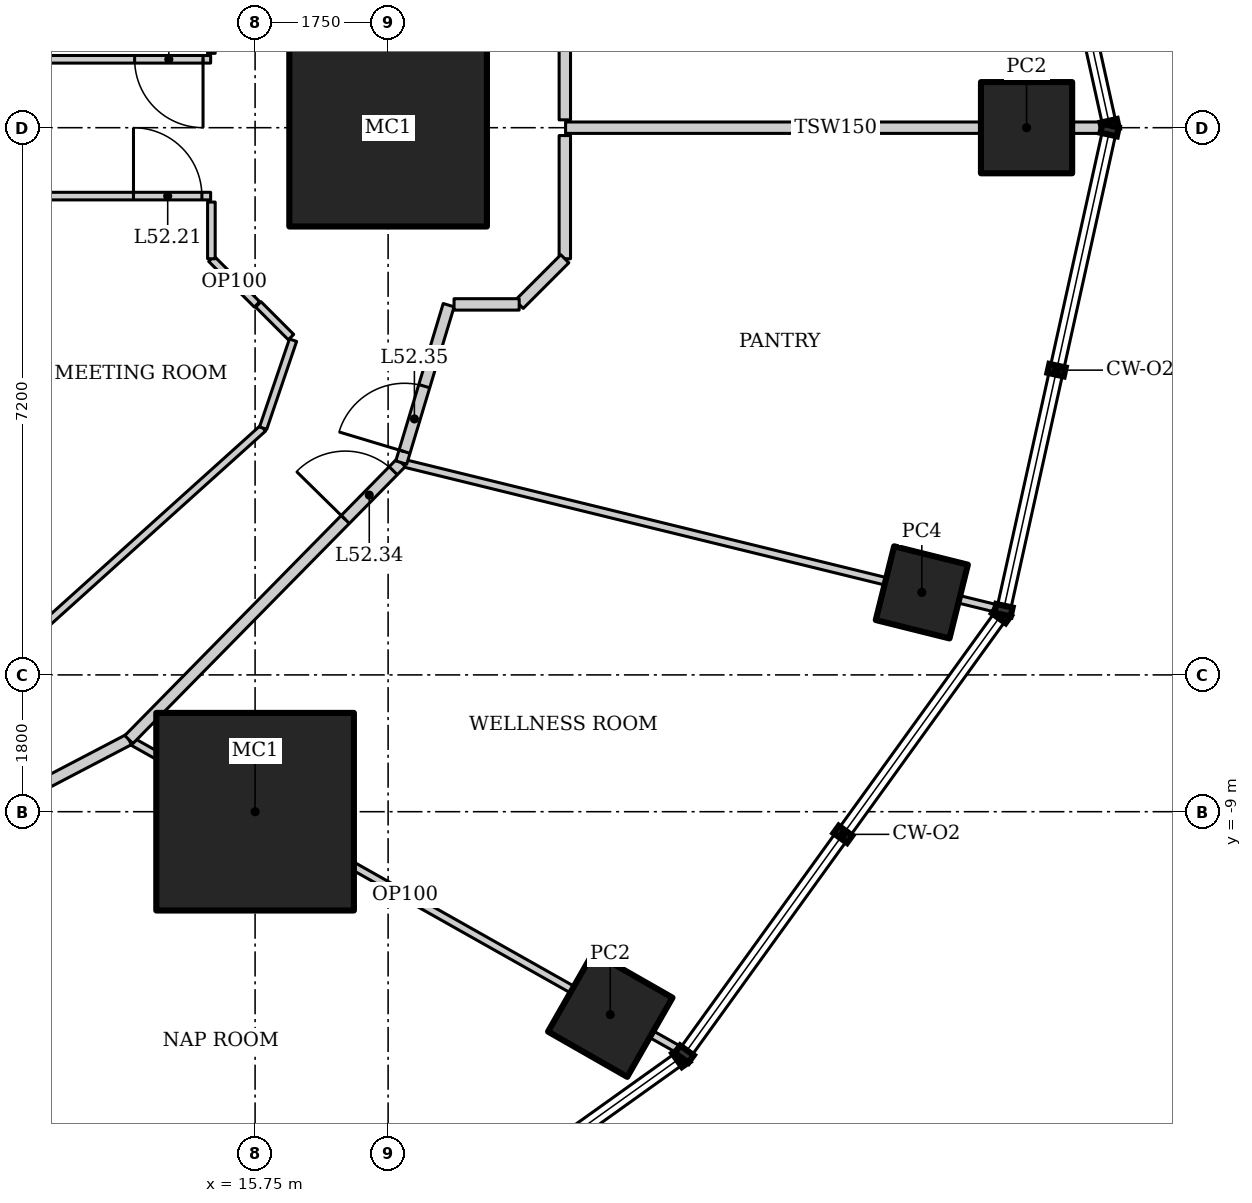
"""IFC4 building model, lengths in metres.
Left out: names, types, materials, properties, quantities, classifications, styles, units other than length and angle.
Written with IfcOpenShell. Run it as: python <this file> out.ifc"""

import sys

from ifc_helpers import new_model, si_unit, direction, frame, frame_2d, origin, origin_2d, place, context, subcontext, project, spatial, rectangle, hollow_rectangle, extrude, element, fill, save


model = new_model("IFC4")
c1 = context("Model", 3, precision=1e-05, world=origin(), true_north=direction((0.0, 1.0)))
c2 = subcontext(c1, "Body", "Model", "MODEL_VIEW")
j1 = project(units=[si_unit("LENGTHUNIT", "METRE"), si_unit("PLANEANGLEUNIT", "RADIAN")], contexts=[c1])
p1 = place(None, origin())
s1 = spatial("IfcSite", under=j1, at=p1, CompositionType="ELEMENT")
p2 = place(p1, origin())
s2 = spatial("IfcBuilding", under=s1, at=p2, CompositionType="ELEMENT")
p3 = place(p2, frame((0.0, 0.0, 224.2)))
s3 = spatial("IfcBuildingStorey", under=s2, at=p3, CompositionType="ELEMENT", Elevation=224.2)
for number, where, z_axis, x_axis in (
    (1, (17.5, 0.0, 0.0), (0.0, 0.0, 1.0), (1.0, 0.0, 0.0)),
    (2, (15.75, -9.0, 0.0), (0.0, 0.0, 1.0), (1.0, 0.0, 0.0)),
):
    element("IfcColumn", number, at=place(p3, frame(where, z_axis=z_axis, x_axis=x_axis)), inside=s3, PredefinedType="COLUMN", context=c2, shape_type="SweptSolid", body=[
        extrude(hollow_rectangle(XDim=2.6, YDim=2.6, WallThickness=0.13, at=origin_2d()), origin(), (0.0, 0.0, 1.0), 4.2),
    ])
for number, where, z_axis, x_axis in (
    (3, (25.9, 0.0, 0.0), (0.0, 0.0, 1.0), (1.0, 0.0, 0.0)),
    (4, (20.423, -11.67, 0.0), (0.0, 0.0, 1.0), (0.496, 0.868, 0.0)),
):
    element("IfcColumn", number, at=place(p3, frame(where, z_axis=z_axis, x_axis=x_axis)), inside=s3, PredefinedType="COLUMN", context=c2, shape_type="SweptSolid", body=[
        extrude(hollow_rectangle(XDim=1.2, YDim=1.2, WallThickness=0.1, at=origin_2d()), origin(), (0.0, 0.0, 1.0), 4.2),
    ])
p4 = place(p3, frame((24.522, -6.114, 0.0), z_axis=(0.0, 0.0, 1.0), x_axis=(0.2419218956, 0.970295726276, 0.0)))
e5 = element("IfcColumn", 5, at=p4, inside=s3, PredefinedType="COLUMN", context=c2, shape_type="SweptSolid", body=[
    extrude(hollow_rectangle(XDim=1.0, YDim=1.0, WallThickness=0.08, at=origin_2d()), origin(), (0.0, 0.0, 1.0), 4.2),
])
p5 = place(p3, frame((15.709, -16.199, 0.0), z_axis=(0.0, 0.0, 1.0), x_axis=(-0.69875697861, 0.715359129978, 0.0)))
e6 = element("IfcWall", 6, at=p5, inside=s3, PredefinedType="PARTITIONING", context=c2, shape_type="SweptSolid", body=[
    extrude(rectangle(XDim=8.323, YDim=0.1, at=frame_2d((4.162, 0.0))), origin(), (0.0, 0.0, 1.0), 3.41),
])
p6 = place(p3, frame((21.358, -12.15, 0.0), z_axis=(0.0, 0.0, 1.0), x_axis=(-0.871080529249, 0.491140215786, 0.0)))
e7 = element("IfcWall", 7, at=p6, inside=s3, PredefinedType="PARTITIONING", context=c2, shape_type="SweptSolid", body=[
    extrude(rectangle(XDim=8.345, YDim=0.1, at=frame_2d((4.173, 0.0))), origin(), (0.0, 0.0, 1.0), 3.522),
])
p7 = place(p3, frame((25.543, -6.336, 0.0), z_axis=(0.0, 0.0, 1.0), x_axis=(-0.97123661777, 0.238116425942, 0.0)))
e8 = element("IfcWall", 8, at=p7, inside=s3, PredefinedType="PARTITIONING", context=c2, shape_type="SweptSolid", body=[
    extrude(rectangle(XDim=8.103, YDim=0.1, at=frame_2d((4.052, 0.0))), origin(), (0.0, 0.0, 1.0), 3.108),
])
p8 = place(p3, frame((9.893, -10.245, 0.0), z_axis=(0.0, 0.0, 1.0), x_axis=(0.886174439647, 0.463351769735, 0.0)))
e9 = element("IfcWall", 9, at=p8, inside=s3, PredefinedType="PARTITIONING", context=c2, shape_type="SweptSolid", body=[
    extrude(rectangle(XDim=4.735, YDim=0.15, at=frame_2d((2.367, 0.0))), origin(), (0.0, 0.0, 1.0), 4.05),
])
p9 = place(p8, frame((0.15, 0.0, 0.0)))
e10 = element("IfcOpeningElement", 10, at=p9, cuts=e9, PredefinedType="OPENING", context=c2, shape_type="SweptSolid", body=[
    extrude(rectangle(XDim=0.9, YDim=2.1, at=frame_2d((0.45, 1.05))), frame((0.0, 0.085, 0.0), z_axis=(0.0, -1.0, 0.0), x_axis=(1.0, 0.0, 0.0)), (0.0, 0.0, 1.0), 0.17),
])
p10 = place(p3, frame((14.089, -8.051, 0.0), z_axis=(0.0, 0.0, 1.0), x_axis=(0.701111216625, 0.713051934941, 0.0)))
e11 = element("IfcWall", 11, at=p10, inside=s3, PredefinedType="PARTITIONING", context=c2, shape_type="SweptSolid", body=[
    extrude(rectangle(XDim=5.112, YDim=0.15, at=frame_2d((2.556, 0.0))), origin(), (0.0, 0.0, 1.0), 4.05),
])
p11 = place(p10, frame((4.061, 0.0, 0.0)))
e12 = element("IfcOpeningElement", 12, at=p11, cuts=e11, PredefinedType="OPENING", context=c2, shape_type="SweptSolid", body=[
    extrude(rectangle(XDim=0.9, YDim=2.1, at=frame_2d((0.45, 1.05))), frame((0.0, 0.085, 0.0), z_axis=(0.0, -1.0, 0.0), x_axis=(1.0, 0.0, 0.0)), (0.0, 0.0, 1.0), 0.17),
])
p12 = place(p3, frame((15.856, -3.953, 0.0), z_axis=(0.0, 0.0, 1.0), x_axis=(-0.743177243228, -0.669094601046, 0.0)))
e13 = element("IfcWall", 13, at=p12, inside=s3, PredefinedType="PARTITIONING", context=c2, shape_type="SweptSolid", body=[
    extrude(rectangle(XDim=3.843, YDim=0.1, at=frame_2d((1.921, 0.0))), origin(), (0.0, 0.0, 1.0), 4.05),
])
p13 = place(p3, frame((26.944, 0.0, 0.0), z_axis=(0.0, 0.0, 1.0), x_axis=(-1.0, 0.0, 0.0)))
e14 = element("IfcWall", 14, at=p13, inside=s3, PredefinedType="PARTITIONING", context=c2, shape_type="SweptSolid", body=[
    extrude(rectangle(XDim=7.109, YDim=0.15, at=frame_2d((3.555, 0.0))), origin(), (0.0, 0.0, 1.0), 3.349),
])
p14 = place(p3, frame((17.673, -4.406, 0.0), z_axis=(0.0, 0.0, 1.0), x_axis=(0.288362447016, 0.957521330912, 0.0)))
e15 = element("IfcWall", 15, at=p14, inside=s3, PredefinedType="PARTITIONING", context=c2, shape_type="SweptSolid", body=[
    extrude(rectangle(XDim=2.163, YDim=0.15, at=frame_2d((1.082, 0.0))), origin(), (0.0, 0.0, 1.0), 4.05),
])
p15 = place(p14, frame((0.15, 0.0, 0.0)))
e16 = element("IfcOpeningElement", 16, at=p15, cuts=e15, PredefinedType="OPENING", context=c2, shape_type="SweptSolid", body=[
    extrude(rectangle(XDim=0.9, YDim=2.1, at=frame_2d((0.45, 1.05))), frame((0.0, 0.085, 0.0), z_axis=(0.0, -1.0, 0.0), x_axis=(1.0, 0.0, 0.0)), (0.0, 0.0, 1.0), 0.17),
])
p16 = place(p3, frame((13.0, -0.9, 0.0), z_axis=(0.0, 0.0, 1.0), x_axis=(1.0, 0.0, 0.0)))
e17 = element("IfcWall", 17, at=p16, inside=s3, PredefinedType="PARTITIONING", context=c2, shape_type="SweptSolid", body=[
    extrude(rectangle(XDim=2.165, YDim=0.1, at=frame_2d((1.083, 0.0))), origin(), (0.0, 0.0, 1.0), 4.05),
])
p17 = place(p16, frame((1.15, 0.0, 0.0)))
e18 = element("IfcOpeningElement", 18, at=p17, cuts=e17, PredefinedType="OPENING", context=c2, shape_type="SweptSolid", body=[
    extrude(rectangle(XDim=0.9, YDim=2.1, at=frame_2d((0.45, 1.05))), frame((0.0, 0.06, 0.0), z_axis=(0.0, -1.0, 0.0), x_axis=(1.0, 0.0, 0.0)), (0.0, 0.0, 1.0), 0.12),
])
p18 = place(p3, frame((16.249, -2.796, 0.0), z_axis=(0.0, 0.0, 1.0), x_axis=(-0.321913473529, -0.946769093053, 0.0)))
e19 = element("IfcWall", 19, at=p18, inside=s3, PredefinedType="PARTITIONING", context=c2, shape_type="SweptSolid", body=[
    extrude(rectangle(XDim=1.223, YDim=0.1, at=frame_2d((0.611, 0.0))), origin(), (0.0, 0.0, 1.0), 4.05),
])
p19 = place(p3, frame((15.165, 0.9, 0.0), z_axis=(0.0, 0.0, 1.0), x_axis=(-1.0, 0.0, 0.0)))
e20 = element("IfcWall", 20, at=p19, inside=s3, PredefinedType="PARTITIONING", context=c2, shape_type="SweptSolid", body=[
    extrude(rectangle(XDim=2.165, YDim=0.1, at=frame_2d((1.083, 0.0))), origin(), (0.0, 0.0, 1.0), 4.05),
])
p20 = place(p19, frame((0.1, 0.0, 0.0)))
e21 = element("IfcOpeningElement", 21, at=p20, cuts=e20, PredefinedType="OPENING", context=c2, shape_type="SweptSolid", body=[
    extrude(rectangle(XDim=0.9, YDim=2.1, at=frame_2d((0.45, 1.05))), frame((0.0, 0.06, 0.0), z_axis=(0.0, -1.0, 0.0), x_axis=(1.0, 0.0, 0.0)), (0.0, 0.0, 1.0), 0.12),
])
p21 = place(p3, frame((15.775, -2.325, 0.0), z_axis=(0.0, 0.0, 1.0), x_axis=(-0.707106781187, 0.707106781187, 0.0)))
e22 = element("IfcWall", 22, at=p21, inside=s3, PredefinedType="PARTITIONING", context=c2, shape_type="SweptSolid", body=[
    extrude(rectangle(XDim=0.849, YDim=0.1, at=frame_2d((0.425, 0.0))), origin(), (0.0, 0.0, 1.0), 4.05),
])
p22 = place(p3, frame((15.175, -1.725, 0.0), z_axis=(0.0, 0.0, 1.0), x_axis=(0.0, 1.0, 0.0)))
e23 = element("IfcWall", 23, at=p22, inside=s3, PredefinedType="PARTITIONING", context=c2, shape_type="SweptSolid", body=[
    extrude(rectangle(XDim=0.746, YDim=0.1, at=frame_2d((0.373, 0.0))), origin(), (0.0, 0.0, 1.0), 4.05),
])
p23 = place(p3, frame((16.223, -2.755, 0.0), z_axis=(0.0, 0.0, 1.0), x_axis=(-0.707106781187, 0.707106781187, 0.0)))
e24 = element("IfcWall", 24, at=p23, inside=s3, PredefinedType="PARTITIONING", context=c2, shape_type="SweptSolid", body=[
    extrude(rectangle(XDim=0.608, YDim=0.1, at=frame_2d((0.304, 0.0))), origin(), (0.0, 0.0, 1.0), 4.05),
])
p24 = place(p3, frame((15.175, 0.978, 0.0), z_axis=(0.0, 0.0, 1.0), x_axis=(0.0, 1.0, 0.0)))
e25 = element("IfcWall", 25, at=p24, inside=s3, PredefinedType="PARTITIONING", context=c2, shape_type="SweptSolid", body=[
    extrude(rectangle(XDim=0.746, YDim=0.1, at=frame_2d((0.373, 0.0))), origin(), (0.0, 0.0, 1.0), 4.05),
])
for number, where, z_axis, x_axis in (
    (26, (19.825, 1.725, 0.0), (0.0, 0.0, 1.0), (0.0, -1.0, 0.0)),
    (27, (19.825, -0.103, 0.0), (0.0, 0.0, 1.0), (0.0, -1.0, 0.0)),
):
    element("IfcWall", number, at=place(p3, frame(where, z_axis=z_axis, x_axis=x_axis)), inside=s3, PredefinedType="PARTITIONING", context=c2, shape_type="SweptSolid", body=[
        extrude(rectangle(XDim=1.621, YDim=0.15, at=frame_2d((0.811, 0.0))), origin(), (0.0, 0.0, 1.0), 4.05),
    ])
p25 = place(p3, frame((19.825, -1.725, 0.0), z_axis=(0.0, 0.0, 1.0), x_axis=(-0.707106781187, -0.707106781187, 0.0)))
e28 = element("IfcWall", 28, at=p25, inside=s3, PredefinedType="PARTITIONING", context=c2, shape_type="SweptSolid", body=[
    extrude(rectangle(XDim=0.849, YDim=0.15, at=frame_2d((0.425, 0.0))), origin(), (0.0, 0.0, 1.0), 4.05),
])
p26 = place(p3, frame((19.225, -2.325, 0.0), z_axis=(0.0, 0.0, 1.0), x_axis=(-1.0, 0.0, 0.0)))
e29 = element("IfcWall", 29, at=p26, inside=s3, PredefinedType="PARTITIONING", context=c2, shape_type="SweptSolid", body=[
    extrude(rectangle(XDim=0.857, YDim=0.15, at=frame_2d((0.429, 0.0))), origin(), (0.0, 0.0, 1.0), 4.05),
])
p27 = place(p17, origin())
e30 = element("IfcDoor", 30, at=p27, inside=s3, OperationType="SINGLE_SWING_LEFT", PredefinedType="DOOR", context=c2, shape_type="SweptSolid", body=[
    extrude(rectangle(XDim=0.9, YDim=2.1, at=frame_2d((0.45, 1.05))), frame((0.0, 0.025, 0.0), z_axis=(0.0, -1.0, 0.0), x_axis=(1.0, 0.0, 0.0)), (0.0, 0.0, 1.0), 0.05),
])
fill(e18, e30)
p28 = place(p20, origin())
e31 = element("IfcDoor", 31, at=p28, inside=s3, OperationType="SINGLE_SWING_LEFT", PredefinedType="DOOR", context=c2, shape_type="SweptSolid", body=[
    extrude(rectangle(XDim=0.9, YDim=2.1, at=frame_2d((0.45, 1.05))), frame((0.0, 0.025, 0.0), z_axis=(0.0, -1.0, 0.0), x_axis=(1.0, 0.0, 0.0)), (0.0, 0.0, 1.0), 0.05),
])
fill(e21, e31)
p29 = place(p11, origin())
e32 = element("IfcDoor", 32, at=p29, inside=s3, OperationType="SINGLE_SWING_LEFT", PredefinedType="DOOR", context=c2, shape_type="SweptSolid", body=[
    extrude(rectangle(XDim=0.9, YDim=2.1, at=frame_2d((0.45, 1.05))), frame((0.0, 0.025, 0.0), z_axis=(0.0, -1.0, 0.0), x_axis=(1.0, 0.0, 0.0)), (0.0, 0.0, 1.0), 0.05),
])
fill(e12, e32)
p30 = place(p15, origin())
e33 = element("IfcDoor", 33, at=p30, inside=s3, OperationType="SINGLE_SWING_LEFT", PredefinedType="DOOR", context=c2, shape_type="SweptSolid", body=[
    extrude(rectangle(XDim=0.9, YDim=2.1, at=frame_2d((0.45, 1.05))), frame((0.0, 0.025, 0.0), z_axis=(0.0, -1.0, 0.0), x_axis=(1.0, 0.0, 0.0)), (0.0, 0.0, 1.0), 0.05),
])
fill(e16, e33)
save(model, sys.argv[1])
